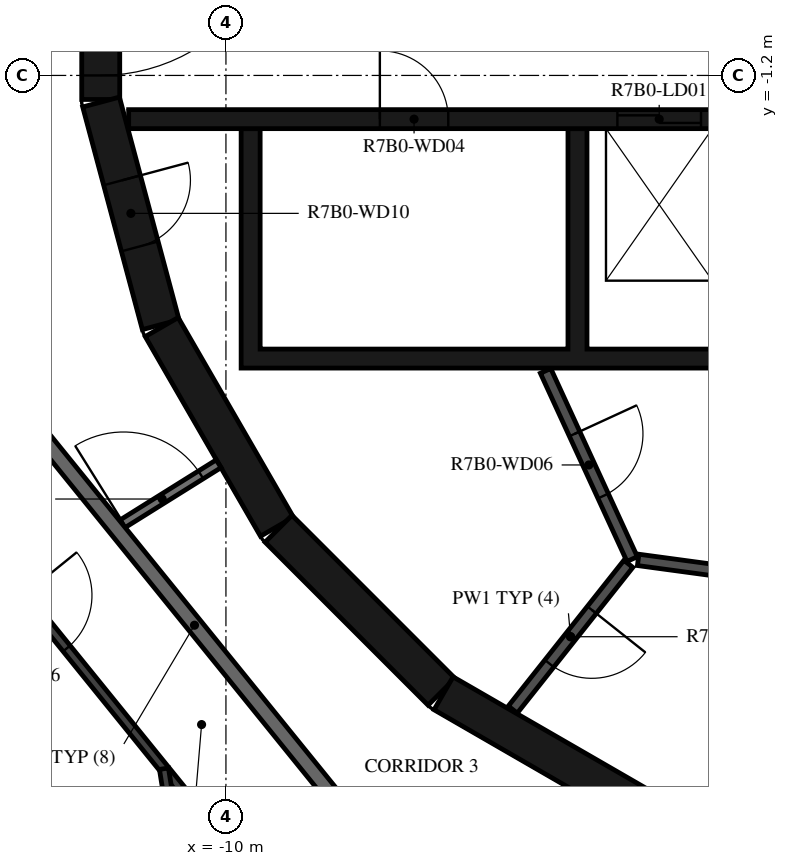
"""IFC4 building model, lengths in metres.
Left out: names, types, materials, properties, quantities, classifications, styles, units other than length and angle.
Written with IfcOpenShell. Run it as: python <this file> out.ifc"""

import sys

from ifc_helpers import new_model, si_unit, direction, frame, frame_2d, origin, place, context, subcontext, project, spatial, polyline, rectangle, outline, extrude, element, fill, save


model = new_model("IFC4")
c1 = context("Model", 3, precision=1e-05, world=origin(), true_north=direction((0.0, 1.0)))
c2 = subcontext(c1, "Body", "Model", "MODEL_VIEW")
j1 = project(units=[si_unit("LENGTHUNIT", "METRE"), si_unit("PLANEANGLEUNIT", "RADIAN")], contexts=[c1])
p1 = place(None, origin())
s1 = spatial("IfcSite", under=j1, at=p1, CompositionType="ELEMENT")
p2 = place(p1, origin())
s2 = spatial("IfcBuilding", under=s1, at=p2, CompositionType="ELEMENT")
p3 = place(p2, frame((0.0, 0.0, 277.4)))
s3 = spatial("IfcBuildingStorey", under=s2, at=p3, CompositionType="ELEMENT", Elevation=277.4)
p4 = place(p3, frame((-11.647, 1.516, 0.0), z_axis=(0.0, 0.0, 1.0), x_axis=(0.0, -1.0, 0.0)))
e1 = element("IfcWall", 1, at=p4, inside=s3, PredefinedType="SHEAR", context=c2, shape_type="SweptSolid", body=[
    extrude(rectangle(XDim=3.033, YDim=0.5, at=frame_2d((1.516, 0.0))), origin(), (0.0, 0.0, 1.0), 3.12),
])
p5 = place(p4, frame((0.316, 0.0, 0.0)))
e2 = element("IfcOpeningElement", 2, at=p5, cuts=e1, PredefinedType="OPENING", context=c2, shape_type="SweptSolid", body=[
    extrude(rectangle(XDim=2.4, YDim=2.1, at=frame_2d((1.2, 1.05))), frame((0.0, 0.26, 0.0), z_axis=(0.0, -1.0, 0.0), x_axis=(1.0, 0.0, 0.0)), (0.0, 0.0, 1.0), 0.52),
])
p6 = place(p3, frame((-11.643, -1.55, 0.0), z_axis=(0.0, 0.0, 1.0), x_axis=(0.258734743916, -0.965948410781, 0.0)))
e3 = element("IfcWall", 3, at=p6, inside=s3, PredefinedType="SHEAR", context=c2, shape_type="SweptSolid", body=[
    extrude(rectangle(XDim=3.033, YDim=0.5, at=frame_2d((1.516, 0.0))), origin(), (0.0, 0.0, 1.0), 3.12),
])
p7 = place(p6, frame((1.066, 0.0, 0.0)))
e4 = element("IfcOpeningElement", 4, at=p7, cuts=e3, PredefinedType="OPENING", context=c2, shape_type="SweptSolid", body=[
    extrude(rectangle(XDim=0.9, YDim=2.1, at=frame_2d((0.45, 1.05))), frame((0.0, 0.26, 0.0), z_axis=(0.0, -1.0, 0.0), x_axis=(1.0, 0.0, 0.0)), (0.0, 0.0, 1.0), 0.52),
])
p8 = place(p3, frame((-10.845, -4.51, 0.0), z_axis=(0.0, 0.0, 1.0), x_axis=(0.500087131594, -0.865975092491, 0.0)))
e5 = element("IfcWall", 5, at=p8, inside=s3, PredefinedType="SHEAR", context=c2, shape_type="SweptSolid", body=[
    extrude(rectangle(XDim=3.033, YDim=0.5, at=frame_2d((1.516, 0.0))), origin(), (0.0, 0.0, 1.0), 3.12),
])
p9 = place(p3, frame((-9.308, -7.164, 0.0), z_axis=(0.0, 0.0, 1.0), x_axis=(0.707106781187, -0.707106781187, 0.0)))
e6 = element("IfcWall", 6, at=p9, inside=s3, PredefinedType="SHEAR", context=c2, shape_type="SweptSolid", body=[
    extrude(rectangle(XDim=3.032, YDim=0.5, at=frame_2d((1.516, 0.0))), origin(), (0.0, 0.0, 1.0), 3.12),
])
p10 = place(p3, frame((-7.137, -9.329, 0.0), z_axis=(0.0, 0.0, 1.0), x_axis=(0.865975092491, -0.500087131594, 0.0)))
e7 = element("IfcWall", 7, at=p10, inside=s3, PredefinedType="SHEAR", context=c2, shape_type="SweptSolid", body=[
    extrude(rectangle(XDim=3.033, YDim=0.5, at=frame_2d((1.516, 0.0))), origin(), (0.0, 0.0, 1.0), 3.12),
])
p11 = place(p3, origin())
e8 = element("IfcWall", 8, at=p11, inside=s3, PredefinedType="SHEAR", context=c2, shape_type="SweptSolid", body=[
    extrude(outline(polyline([(9.8, -5.05), (9.8, -4.8), (9.8, -1.9), (9.55, -1.9), (9.55, -4.8), (7.65, -4.8), (7.65, -1.9), (7.4, -1.9), (7.4, -4.8), (5.5, -4.8), (5.5, -1.9), (5.25, -1.9), (5.25, -4.8), (3.35, -4.8), (3.35, -1.9), (3.1, -1.9), (3.1, -4.8), (1.2, -4.8), (1.2, -1.9), (0.95, -1.9), (0.95, -4.8), (-0.95, -4.8), (-0.95, -1.9), (-1.2, -1.9), (-1.2, -4.8), (-3.1, -4.8), (-3.1, -1.9), (-3.35, -1.9), (-3.35, -4.8), (-5.25, -4.8), (-5.25, -1.9), (-5.5, -1.9), (-5.5, -4.8), (-9.55, -4.8), (-9.55, -1.9), (-9.8, -1.9), (-9.8, -4.8), (-9.8, -5.05), (9.8, -5.05)])), origin(), (0.0, 0.0, 1.0), 3.12),
])
p12 = place(p3, frame((-11.28, -1.775, 0.0), z_axis=(0.0, 0.0, 1.0), x_axis=(1.0, 0.0, 0.0)))
e9 = element("IfcWall", 9, at=p12, inside=s3, PredefinedType="SHEAR", context=c2, shape_type="SweptSolid", body=[
    extrude(rectangle(XDim=14.38, YDim=0.25, at=frame_2d((7.19, 0.0))), origin(), (0.0, 0.0, 1.0), 3.12),
])
p13 = place(p12, frame((6.43, 0.0, 0.0)))
e10 = element("IfcOpeningElement", 10, at=p13, cuts=e9, PredefinedType="OPENING", context=c2, shape_type="SweptSolid", body=[
    extrude(rectangle(XDim=1.1, YDim=2.1, at=frame_2d((0.55, 1.05))), frame((0.0, 0.135, 0.0), z_axis=(0.0, -1.0, 0.0), x_axis=(1.0, 0.0, 0.0)), (0.0, 0.0, 1.0), 0.27),
])
p14 = place(p12, frame((8.58, 0.0, 0.0)))
e11 = element("IfcOpeningElement", 11, at=p14, cuts=e9, PredefinedType="OPENING", context=c2, shape_type="SweptSolid", body=[
    extrude(rectangle(XDim=1.1, YDim=2.1, at=frame_2d((0.55, 1.05))), frame((0.0, 0.135, 0.0), z_axis=(0.0, -1.0, 0.0), x_axis=(1.0, 0.0, 0.0)), (0.0, 0.0, 1.0), 0.27),
])
p15 = place(p12, frame((10.73, 0.0, 0.0)))
e12 = element("IfcOpeningElement", 12, at=p15, cuts=e9, PredefinedType="OPENING", context=c2, shape_type="SweptSolid", body=[
    extrude(rectangle(XDim=1.1, YDim=2.1, at=frame_2d((0.55, 1.05))), frame((0.0, 0.135, 0.0), z_axis=(0.0, -1.0, 0.0), x_axis=(1.0, 0.0, 0.0)), (0.0, 0.0, 1.0), 0.27),
])
p16 = place(p12, frame((3.305, 0.0, 0.0)))
e13 = element("IfcOpeningElement", 13, at=p16, cuts=e9, PredefinedType="OPENING", context=c2, shape_type="SweptSolid", body=[
    extrude(rectangle(XDim=0.9, YDim=2.1, at=frame_2d((0.45, 1.05))), frame((0.0, 0.135, 0.0), z_axis=(0.0, -1.0, 0.0), x_axis=(1.0, 0.0, 0.0)), (0.0, 0.0, 1.0), 0.27),
])
p17 = place(p12, frame((12.98, 0.0, 0.0)))
e14 = element("IfcOpeningElement", 14, at=p17, cuts=e9, PredefinedType="OPENING", context=c2, shape_type="SweptSolid", body=[
    extrude(rectangle(XDim=0.9, YDim=2.1, at=frame_2d((0.45, 1.05))), frame((0.0, 0.135, 0.0), z_axis=(0.0, -1.0, 0.0), x_axis=(1.0, 0.0, 0.0)), (0.0, 0.0, 1.0), 0.27),
])
p18 = place(p3, frame((-5.795, -5.086, 0.0), z_axis=(0.0, 0.0, 1.0), x_axis=(0.417887867606, -0.908498613157, 0.0)))
e15 = element("IfcWall", 15, at=p18, inside=s3, PredefinedType="PARTITIONING", context=c2, shape_type="SweptSolid", body=[
    extrude(rectangle(XDim=2.726, YDim=0.15, at=frame_2d((1.363, 0.0))), origin(), (0.0, 0.0, 1.0), 3.12),
])
p19 = place(p18, frame((0.913, 0.0, 0.0)))
e16 = element("IfcOpeningElement", 16, at=p19, cuts=e15, PredefinedType="OPENING", context=c2, shape_type="SweptSolid", body=[
    extrude(rectangle(XDim=0.9, YDim=2.1, at=frame_2d((0.45, 1.05))), frame((0.0, 0.085, 0.0), z_axis=(0.0, -1.0, 0.0), x_axis=(1.0, 0.0, 0.0)), (0.0, 0.0, 1.0), 0.17),
])
p20 = place(p3, frame((-4.706, -7.625, 0.0), z_axis=(0.0, 0.0, 1.0), x_axis=(-0.621392599334, -0.783499353856, 0.0)))
e17 = element("IfcWall", 17, at=p20, inside=s3, PredefinedType="PARTITIONING", context=c2, shape_type="SweptSolid", body=[
    extrude(rectangle(XDim=2.447, YDim=0.15, at=frame_2d((1.224, 0.0))), origin(), (0.0, 0.0, 1.0), 3.12),
])
p21 = place(p20, frame((0.774, 0.0, 0.0)))
e18 = element("IfcOpeningElement", 18, at=p21, cuts=e17, PredefinedType="OPENING", context=c2, shape_type="SweptSolid", body=[
    extrude(rectangle(XDim=0.9, YDim=2.1, at=frame_2d((0.45, 1.05))), frame((0.0, 0.085, 0.0), z_axis=(0.0, -1.0, 0.0), x_axis=(1.0, 0.0, 0.0)), (0.0, 0.0, 1.0), 0.17),
])
p22 = place(p3, frame((-2.42, -7.865, 0.0), z_axis=(0.0, 0.0, 1.0), x_axis=(-0.990972299108, 0.134066783362, 0.0)))
e19 = element("IfcWall", 19, at=p22, inside=s3, PredefinedType="PARTITIONING", context=c2, shape_type="SweptSolid", body=[
    extrude(rectangle(XDim=2.176, YDim=0.15, at=frame_2d((1.088, 0.0))), origin(), (0.0, 0.0, 1.0), 3.12),
])
p23 = place(p3, frame((-11.449, -7.154, 0.0), z_axis=(0.0, 0.0, 1.0), x_axis=(0.848067047543, 0.529888934468, 0.0)))
e20 = element("IfcWall", 20, at=p23, inside=s3, PredefinedType="PARTITIONING", context=c2, shape_type="SweptSolid", body=[
    extrude(rectangle(XDim=1.596, YDim=0.12, at=frame_2d((0.798, 0.0))), origin(), (0.0, 0.0, 1.0), 3.12),
])
p24 = place(p23, frame((0.12, 0.0, 0.0)))
e21 = element("IfcOpeningElement", 21, at=p24, cuts=e20, PredefinedType="OPENING", context=c2, shape_type="SweptSolid", body=[
    extrude(rectangle(XDim=1.2, YDim=2.1, at=frame_2d((0.6, 1.05))), frame((0.0, 0.07, 0.0), z_axis=(0.0, -1.0, 0.0), x_axis=(1.0, 0.0, 0.0)), (0.0, 0.0, 1.0), 0.14),
])
p25 = place(p3, frame((-12.673, -5.643, 0.0), z_axis=(0.0, 0.0, 1.0), x_axis=(0.629302871585, -0.777160148113, 0.0)))
e22 = element("IfcWall", 22, at=p25, inside=s3, PredefinedType="STANDARD", context=c2, shape_type="SweptSolid", body=[
    extrude(rectangle(XDim=7.181, YDim=0.2, at=frame_2d((3.59, 0.0))), origin(), (0.0, 0.0, 1.0), 3.12),
])
p26 = place(p3, frame((-12.788, -7.884, 0.0), z_axis=(0.0, 0.0, 1.0), x_axis=(0.6293312414, -0.777137174891, 0.0)))
e23 = element("IfcWall", 23, at=p26, inside=s3, PredefinedType="PARTITIONING", context=c2, shape_type="SweptSolid", body=[
    extrude(rectangle(XDim=5.913, YDim=0.12, at=frame_2d((2.957, 0.0))), origin(), (0.0, 0.0, 1.0), 3.12),
])
p27 = place(p26, frame((0.2, 0.0, 0.0)))
e24 = element("IfcOpeningElement", 24, at=p27, cuts=e23, PredefinedType="OPENING", context=c2, shape_type="SweptSolid", body=[
    extrude(rectangle(XDim=0.9, YDim=2.1, at=frame_2d((0.45, 1.05))), frame((0.0, 0.07, 0.0), z_axis=(0.0, -1.0, 0.0), x_axis=(1.0, 0.0, 0.0)), (0.0, 0.0, 1.0), 0.14),
])
p28 = place(p26, frame((4.635, 0.0, 0.0)))
e25 = element("IfcOpeningElement", 25, at=p28, cuts=e23, PredefinedType="OPENING", context=c2, shape_type="SweptSolid", body=[
    extrude(rectangle(XDim=0.9, YDim=2.1, at=frame_2d((0.45, 1.05))), frame((0.0, 0.07, 0.0), z_axis=(0.0, -1.0, 0.0), x_axis=(1.0, 0.0, 0.0)), (0.0, 0.0, 1.0), 0.14),
])
p29 = place(p3, frame((-9.619, -17.871, 0.0), z_axis=(0.0, 0.0, 1.0), x_axis=(-0.156433255633, 0.987688532146, 0.0)))
e26 = element("IfcWall", 26, at=p29, inside=s3, PredefinedType="PARTITIONING", context=c2, shape_type="SweptSolid", body=[
    extrude(rectangle(XDim=7.644, YDim=0.12, at=frame_2d((3.822, 0.0))), origin(), (0.0, 0.0, 1.0), 3.12),
])
p30 = place(p29, frame((3.087, 0.0, 0.0)))
e27 = element("IfcOpeningElement", 27, at=p30, cuts=e26, PredefinedType="OPENING", context=c2, shape_type="SweptSolid", body=[
    extrude(rectangle(XDim=0.9, YDim=2.1, at=frame_2d((0.45, 1.05))), frame((0.0, 0.07, 0.0), z_axis=(0.0, -1.0, 0.0), x_axis=(1.0, 0.0, 0.0)), (0.0, 0.0, 1.0), 0.14),
])
p31 = place(p5, origin())
e28 = element("IfcDoor", 28, at=p31, inside=s3, OperationType="DOUBLE_DOOR_SINGLE_SWING", PredefinedType="DOOR", context=c2, shape_type="SweptSolid", body=[
    extrude(rectangle(XDim=2.4, YDim=2.1, at=frame_2d((1.2, 1.05))), frame((0.0, 0.025, 0.0), z_axis=(0.0, -1.0, 0.0), x_axis=(1.0, 0.0, 0.0)), (0.0, 0.0, 1.0), 0.05),
])
fill(e2, e28)
p32 = place(p13, origin())
e29 = element("IfcDoor", 29, at=p32, inside=s3, OperationType="DOUBLE_DOOR_SLIDING", PredefinedType="DOOR", context=c2, shape_type="SweptSolid", body=[
    extrude(rectangle(XDim=1.1, YDim=2.1, at=frame_2d((0.55, 1.05))), frame((0.0, 0.025, 0.0), z_axis=(0.0, -1.0, 0.0), x_axis=(1.0, 0.0, 0.0)), (0.0, 0.0, 1.0), 0.05),
])
fill(e10, e29)
p33 = place(p16, origin())
e30 = element("IfcDoor", 30, at=p33, inside=s3, OperationType="SINGLE_SWING_RIGHT", PredefinedType="DOOR", context=c2, shape_type="SweptSolid", body=[
    extrude(rectangle(XDim=0.9, YDim=2.1, at=frame_2d((0.45, 1.05))), frame((0.0, 0.025, 0.0), z_axis=(0.0, -1.0, 0.0), x_axis=(1.0, 0.0, 0.0)), (0.0, 0.0, 1.0), 0.05),
])
fill(e13, e30)
p34 = place(p19, origin())
e31 = element("IfcDoor", 31, at=p34, inside=s3, OperationType="SINGLE_SWING_RIGHT", PredefinedType="DOOR", context=c2, shape_type="SweptSolid", body=[
    extrude(rectangle(XDim=0.9, YDim=2.1, at=frame_2d((0.45, 1.05))), frame((0.0, 0.025, 0.0), z_axis=(0.0, -1.0, 0.0), x_axis=(1.0, 0.0, 0.0)), (0.0, 0.0, 1.0), 0.05),
])
fill(e16, e31)
p35 = place(p21, origin())
e32 = element("IfcDoor", 32, at=p35, inside=s3, OperationType="SINGLE_SWING_LEFT", PredefinedType="DOOR", context=c2, shape_type="SweptSolid", body=[
    extrude(rectangle(XDim=0.9, YDim=2.1, at=frame_2d((0.45, 1.05))), frame((0.0, 0.025, 0.0), z_axis=(0.0, -1.0, 0.0), x_axis=(1.0, 0.0, 0.0)), (0.0, 0.0, 1.0), 0.05),
])
fill(e18, e32)
p36 = place(p7, origin())
e33 = element("IfcDoor", 33, at=p36, inside=s3, OperationType="SINGLE_SWING_RIGHT", PredefinedType="DOOR", context=c2, shape_type="SweptSolid", body=[
    extrude(rectangle(XDim=0.9, YDim=2.1, at=frame_2d((0.45, 1.05))), frame((0.0, 0.025, 0.0), z_axis=(0.0, -1.0, 0.0), x_axis=(1.0, 0.0, 0.0)), (0.0, 0.0, 1.0), 0.05),
])
fill(e4, e33)
p37 = place(p27, origin())
e34 = element("IfcDoor", 34, at=p37, inside=s3, OperationType="SINGLE_SWING_RIGHT", PredefinedType="DOOR", context=c2, shape_type="SweptSolid", body=[
    extrude(rectangle(XDim=0.9, YDim=2.1, at=frame_2d((0.45, 1.05))), frame((0.0, 0.025, 0.0), z_axis=(0.0, -1.0, 0.0), x_axis=(1.0, 0.0, 0.0)), (0.0, 0.0, 1.0), 0.05),
])
fill(e24, e34)
p38 = place(p24, origin())
e35 = element("IfcDoor", 35, at=p38, inside=s3, OperationType="DOUBLE_DOOR_SINGLE_SWING", PredefinedType="DOOR", context=c2, shape_type="SweptSolid", body=[
    extrude(rectangle(XDim=1.2, YDim=2.1, at=frame_2d((0.6, 1.05))), frame((0.0, 0.025, 0.0), z_axis=(0.0, -1.0, 0.0), x_axis=(1.0, 0.0, 0.0)), (0.0, 0.0, 1.0), 0.05),
])
fill(e21, e35)
save(model, sys.argv[1])
